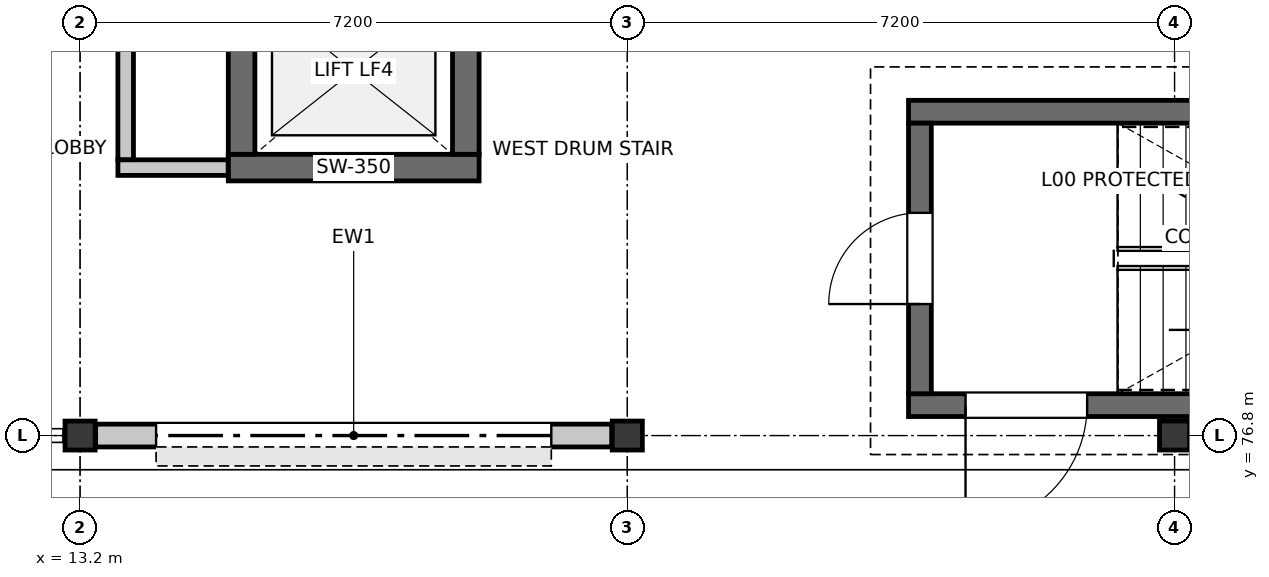
"""IFC4 building model, lengths in metres.
Left out: names, types, materials, properties, quantities, classifications, styles, units other than length and angle.
Written with IfcOpenShell. Run it as: python <this file> out.ifc"""

import sys

from ifc_helpers import new_model, si_unit, direction, frame, frame_2d, origin, origin_2d, place, context, subcontext, project, spatial, rectangle, i_section, extrude, element, fill, save


model = new_model("IFC4")
c1 = context("Model", 3, precision=1e-05, world=origin(), true_north=direction((0.0, 1.0)))
c2 = subcontext(c1, "Body", "Model", "MODEL_VIEW")
j1 = project(units=[si_unit("LENGTHUNIT", "METRE"), si_unit("PLANEANGLEUNIT", "RADIAN")], contexts=[c1])
p1 = place(None, origin())
s1 = spatial("IfcSite", under=j1, at=p1, CompositionType="ELEMENT")
p2 = place(p1, origin())
s2 = spatial("IfcBuilding", under=s1, at=p2, CompositionType="ELEMENT")
p3 = place(p2, origin())
s3 = spatial("IfcBuildingStorey", under=s2, at=p3, CompositionType="ELEMENT", Elevation=0.0)
for number, where, z_axis, x_axis in (
    (1, (13.2, 76.8, 0.0), (0.0, 0.0, 1.0), (1.0, 0.0, 0.0)),
    (2, (20.4, 76.8, 0.0), (0.0, 0.0, 1.0), (1.0, 0.0, 0.0)),
    (3, (27.6, 76.8, 0.0), (0.0, 0.0, 1.0), (1.0, 0.0, 0.0)),
):
    element("IfcColumn", number, at=place(p3, frame(where, z_axis=z_axis, x_axis=x_axis)), inside=s3, PredefinedType="COLUMN", context=c2, shape_type="SweptSolid", body=[
        extrude(i_section(OverallWidth=0.396, OverallDepth=0.381, WebThickness=0.019, FlangeThickness=0.03, FilletRadius=0.015, at=origin_2d()), origin(), (0.0, 0.0, 1.0), 5.4),
    ])
p4 = place(p3, frame((20.195, 76.8, 0.0), z_axis=(0.0, 0.0, 1.0), x_axis=(-1.0, 0.0, 0.0)))
e4 = element("IfcWall", 4, at=p4, inside=s3, PredefinedType="STANDARD", context=c2, shape_type="SweptSolid", body=[
    extrude(rectangle(XDim=6.79, YDim=0.3, at=frame_2d((3.395, 0.0))), origin(), (0.0, 0.0, 1.0), 4.523),
])
p5 = place(p4, frame((0.795, 0.0, 0.0)))
e5 = element("IfcOpeningElement", 5, at=p5, cuts=e4, PredefinedType="OPENING", context=c2, shape_type="SweptSolid", body=[
    extrude(rectangle(XDim=5.2, YDim=4.1, at=frame_2d((2.6, 2.05))), frame((0.0, 0.16, 0.0), z_axis=(0.0, -1.0, 0.0), x_axis=(1.0, 0.0, 0.0)), (0.0, 0.0, 1.0), 0.32),
])
p6 = place(p3, frame((33.5, 77.2, 0.0), z_axis=(0.0, 0.0, 1.0), x_axis=(-1.0, 0.0, 0.0)))
e6 = element("IfcWall", 6, at=p6, inside=s3, PredefinedType="SOLIDWALL", context=c2, shape_type="SweptSolid", body=[
    extrude(rectangle(XDim=9.4, YDim=0.3, at=frame_2d((4.7, 0.0))), origin(), (0.0, 0.0, 1.0), 5.15),
])
p7 = place(p6, frame((7.05, 0.0, 0.0)))
e7 = element("IfcOpeningElement", 7, at=p7, cuts=e6, PredefinedType="OPENING", context=c2, shape_type="SweptSolid", body=[
    extrude(rectangle(XDim=1.6, YDim=2.15, at=frame_2d((0.8, 1.075))), frame((0.0, 0.16, 0.0), z_axis=(0.0, -1.0, 0.0), x_axis=(1.0, 0.0, 0.0)), (0.0, 0.0, 1.0), 0.32),
])
p8 = place(p3, frame((24.1, 81.06, 0.0), z_axis=(0.0, 0.0, 1.0), x_axis=(1.0, 0.0, 0.0)))
e8 = element("IfcWall", 8, at=p8, inside=s3, PredefinedType="SOLIDWALL", context=c2, shape_type="SweptSolid", body=[
    extrude(rectangle(XDim=9.4, YDim=0.3, at=frame_2d((4.7, 0.0))), origin(), (0.0, 0.0, 1.0), 5.15),
])
p9 = place(p3, frame((24.25, 77.35, 0.0), z_axis=(0.0, 0.0, 1.0), x_axis=(0.0, 1.0, 0.0)))
e9 = element("IfcWall", 9, at=p9, inside=s3, PredefinedType="SOLIDWALL", context=c2, shape_type="SweptSolid", body=[
    extrude(rectangle(XDim=3.56, YDim=0.3, at=frame_2d((1.78, 0.0))), origin(), (0.0, 0.0, 1.0), 5.15),
])
p10 = place(p9, frame((1.18, 0.0, 0.0)))
e10 = element("IfcOpeningElement", 10, at=p10, cuts=e9, PredefinedType="OPENING", context=c2, shape_type="SweptSolid", body=[
    extrude(rectangle(XDim=1.2, YDim=2.2, at=frame_2d((0.6, 1.1))), frame((0.0, 0.16, 0.0), z_axis=(0.0, -1.0, 0.0), x_axis=(1.0, 0.0, 0.0)), (0.0, 0.0, 1.0), 0.32),
])
p11 = place(p3, frame((18.45, 80.325, 0.0), z_axis=(0.0, 0.0, 1.0), x_axis=(-1.0, 0.0, 0.0)))
e11 = element("IfcWall", 11, at=p11, inside=s3, PredefinedType="SHEAR", context=c2, shape_type="SweptSolid", body=[
    extrude(rectangle(XDim=3.3, YDim=0.35, at=frame_2d((1.65, 0.0))), origin(), (0.0, 0.0, 1.0), 5.15),
])
for number, where, z_axis, x_axis in (
    (12, (15.325, 80.5, 0.0), (0.0, 0.0, 1.0), (0.0, 1.0, 0.0)),
    (13, (18.275, 82.7, 0.0), (0.0, 0.0, 1.0), (0.0, -1.0, 0.0)),
):
    element("IfcWall", number, at=place(p3, frame(where, z_axis=z_axis, x_axis=x_axis)), inside=s3, PredefinedType="SHEAR", context=c2, shape_type="SweptSolid", body=[
        extrude(rectangle(XDim=2.2, YDim=0.35, at=frame_2d((1.1, 0.0))), origin(), (0.0, 0.0, 1.0), 5.15),
    ])
p12 = place(p3, frame((15.148, 80.325, 0.0), z_axis=(0.0, 0.0, 1.0), x_axis=(-1.0, 0.0, 0.0)))
e14 = element("IfcWall", 14, at=p12, inside=s3, PredefinedType="PARTITIONING", context=c2, shape_type="SweptSolid", body=[
    extrude(rectangle(XDim=1.45, YDim=0.205, at=frame_2d((0.725, 0.0))), origin(), (0.0, 0.0, 1.0), 4.518),
])
p13 = place(p3, frame((13.8, 80.43, 0.0), z_axis=(0.0, 0.0, 1.0), x_axis=(0.0, 1.0, 0.0)))
e15 = element("IfcWall", 15, at=p13, inside=s3, PredefinedType="PARTITIONING", context=c2, shape_type="SweptSolid", body=[
    extrude(rectangle(XDim=4.516, YDim=0.205, at=frame_2d((2.258, 0.0))), origin(), (0.0, 0.0, 1.0), 4.518),
])
p14 = place(p13, frame((1.788, 0.0, 0.0)))
e16 = element("IfcOpeningElement", 16, at=p14, cuts=e15, PredefinedType="OPENING", context=c2, shape_type="SweptSolid", body=[
    extrude(rectangle(XDim=0.94, YDim=2.1, at=frame_2d((0.47, 1.05))), frame((0.0, 0.113, 0.0), z_axis=(0.0, -1.0, 0.0), x_axis=(1.0, 0.0, 0.0)), (0.0, 0.0, 1.0), 0.225),
])
p15 = place(p5, origin())
e17 = element("IfcDoor", 17, at=p15, inside=s3, OperationType="ROLLINGUP", PredefinedType="GATE", context=c2, shape_type="SweptSolid", body=[
    extrude(rectangle(XDim=5.2, YDim=4.1, at=frame_2d((2.6, 2.05))), frame((0.0, 0.025, 0.0), z_axis=(0.0, -1.0, 0.0), x_axis=(1.0, 0.0, 0.0)), (0.0, 0.0, 1.0), 0.05),
])
fill(e5, e17)
p16 = place(p7, origin())
e18 = element("IfcDoor", 18, at=p16, inside=s3, OperationType="SINGLE_SWING_RIGHT", PredefinedType="DOOR", context=c2, shape_type="SweptSolid", body=[
    extrude(rectangle(XDim=1.6, YDim=2.15, at=frame_2d((0.8, 1.075))), frame((0.0, 0.025, 0.0), z_axis=(0.0, -1.0, 0.0), x_axis=(1.0, 0.0, 0.0)), (0.0, 0.0, 1.0), 0.05),
])
fill(e7, e18)
p17 = place(p10, origin())
e19 = element("IfcDoor", 19, at=p17, inside=s3, OperationType="SINGLE_SWING_LEFT", PredefinedType="DOOR", context=c2, shape_type="SweptSolid", body=[
    extrude(rectangle(XDim=1.2, YDim=2.2, at=frame_2d((0.6, 1.1))), frame((0.0, 0.025, 0.0), z_axis=(0.0, -1.0, 0.0), x_axis=(1.0, 0.0, 0.0)), (0.0, 0.0, 1.0), 0.05),
])
fill(e10, e19)
save(model, sys.argv[1])
